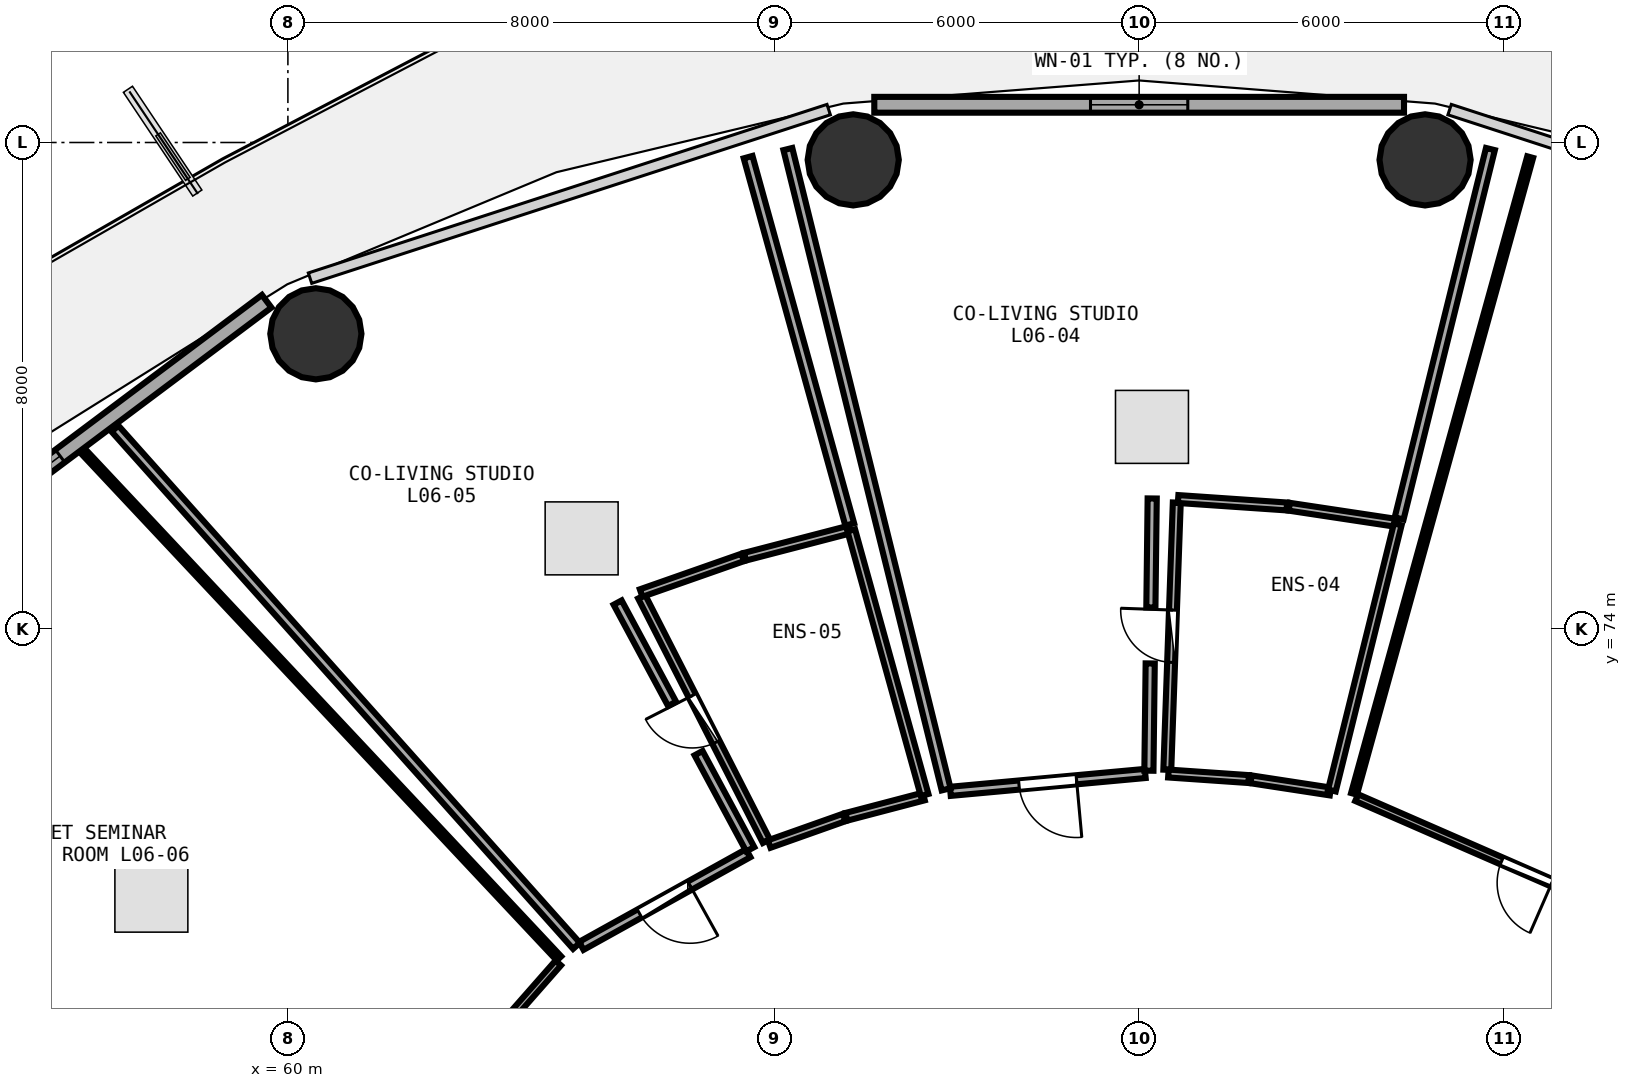
"""IFC4 building model, lengths in metres.
Left out: names, types, materials, properties, quantities, classifications, styles, units other than length and angle.
Written with IfcOpenShell. Run it as: python <this file> out.ifc"""

import sys

from ifc_helpers import new_model, si_unit, direction, frame, frame_2d, origin, origin_2d, place, context, subcontext, project, spatial, rectangle, circle, extrude, element, fill, save


model = new_model("IFC4")
c1 = context("Model", 3, precision=1e-05, world=origin(), true_north=direction((0.0, 1.0)))
c2 = subcontext(c1, "Body", "Model", "MODEL_VIEW")
j1 = project(units=[si_unit("LENGTHUNIT", "METRE"), si_unit("PLANEANGLEUNIT", "RADIAN")], contexts=[c1])
p1 = place(None, origin())
s1 = spatial("IfcSite", under=j1, at=p1, CompositionType="ELEMENT")
p2 = place(p1, origin())
s2 = spatial("IfcBuilding", under=s1, at=p2, CompositionType="ELEMENT")
p3 = place(p2, frame((0.0, 0.0, 26.25)))
s3 = spatial("IfcBuildingStorey", under=s2, at=p3, CompositionType="ELEMENT", Elevation=26.25)
for number, where, z_axis, x_axis in (
    (1, (78.702, 81.714, 0.0), (0.0, 0.0, 1.0), (1.0, 0.0, 0.0)),
    (2, (69.298, 81.714, 0.0), (0.0, 0.0, 1.0), (1.0, 0.0, 0.0)),
    (3, (60.46, 78.854, 0.0), (0.0, 0.0, 1.0), (1.0, 0.0, 0.0)),
):
    element("IfcColumn", number, at=place(p3, frame(where, z_axis=z_axis, x_axis=x_axis)), inside=s3, PredefinedType="COLUMN", context=c2, shape_type="SweptSolid", body=[
        extrude(circle(Radius=0.75, at=origin_2d()), origin(), (0.0, 0.0, 1.0), 3.75),
    ])
p4 = place(p3, frame((78.356, 82.62, 0.0), z_axis=(0.0, 0.0, 1.0), x_axis=(-1.0, 0.0, 0.0)))
e4 = element("IfcWall", 4, at=p4, inside=s3, PredefinedType="SOLIDWALL", context=c2, shape_type="SweptSolid", body=[
    extrude(rectangle(XDim=8.712, YDim=0.26, at=frame_2d((4.356, 0.0))), origin(), (0.0, 0.0, 1.0), 3.475),
])
p5 = place(p4, frame((3.556, 0.0, 0.85)))
e5 = element("IfcOpeningElement", 5, at=p5, cuts=e4, PredefinedType="OPENING", context=c2, shape_type="SweptSolid", body=[
    extrude(rectangle(XDim=1.6, YDim=1.45, at=frame_2d((0.8, 0.725))), frame((0.0, 0.14, 0.0), z_axis=(0.0, -1.0, 0.0), x_axis=(1.0, 0.0, 0.0)), (0.0, 0.0, 1.0), 0.28),
])
p6 = place(p3, frame((59.651, 79.389, 0.0), z_axis=(0.0, 0.0, 1.0), x_axis=(-0.80030733173, -0.599590005569, 0.0)))
e6 = element("IfcWall", 6, at=p6, inside=s3, PredefinedType="SOLIDWALL", context=c2, shape_type="SweptSolid", body=[
    extrude(rectangle(XDim=8.291, YDim=0.26, at=frame_2d((4.145, 0.0))), origin(), (0.0, 0.0, 1.0), 3.475),
])
p7 = place(p6, frame((4.245, 0.0, 0.85)))
e7 = element("IfcOpeningElement", 7, at=p7, cuts=e6, PredefinedType="OPENING", context=c2, shape_type="SweptSolid", body=[
    extrude(rectangle(XDim=1.6, YDim=1.45, at=frame_2d((0.8, 0.725))), frame((0.0, 0.14, 0.0), z_axis=(0.0, -1.0, 0.0), x_axis=(1.0, 0.0, 0.0)), (0.0, 0.0, 1.0), 0.28),
])
p8 = place(p3, frame((83.172, 68.783, 0.0), z_axis=(0.0, 0.0, 1.0), x_axis=(-0.916419655578, 0.400218708797, 0.0)))
e8 = element("IfcWall", 8, at=p8, inside=s3, PredefinedType="PARTITIONING", context=c2, shape_type="SweptSolid", body=[
    extrude(rectangle(XDim=6.104, YDim=0.12, at=frame_2d((3.052, 0.0))), origin(), (0.0, 0.0, 1.0), 2.875),
])
p9 = place(p8, frame((2.602, 0.0, 0.0)))
e9 = element("IfcOpeningElement", 9, at=p9, cuts=e8, PredefinedType="OPENING", context=c2, shape_type="SweptSolid", body=[
    extrude(rectangle(XDim=0.9, YDim=2.08, at=frame_2d((0.45, 1.04))), frame((0.0, 0.07, 0.0), z_axis=(0.0, -1.0, 0.0), x_axis=(1.0, 0.0, 0.0)), (0.0, 0.0, 1.0), 0.14),
])
p10 = place(p3, frame((74.463, 71.684, 0.0), z_axis=(0.0, 0.0, 1.0), x_axis=(0.035428098094, 0.999372227884, 0.0)))
e10 = element("IfcWall", 10, at=p10, inside=s3, PredefinedType="PLUMBINGWALL", context=c2, shape_type="SweptSolid", body=[
    extrude(rectangle(XDim=4.396, YDim=0.13, at=frame_2d((2.198, 0.0))), origin(), (0.0, 0.0, 1.0), 3.175),
])
p11 = place(p10, frame((1.768, 0.0, 0.0)))
e11 = element("IfcOpeningElement", 11, at=p11, cuts=e10, PredefinedType="OPENING", context=c2, shape_type="SweptSolid", body=[
    extrude(rectangle(XDim=0.86, YDim=2.05, at=frame_2d((0.43, 1.025))), frame((0.0, 0.075, 0.0), z_axis=(0.0, -1.0, 0.0), x_axis=(1.0, 0.0, 0.0)), (0.0, 0.0, 1.0), 0.15),
])
p12 = place(p3, frame((74.1, 71.624, 0.0), z_axis=(0.0, 0.0, 1.0), x_axis=(-0.995822031417, -0.091315287572, 0.0)))
e12 = element("IfcWall", 12, at=p12, inside=s3, PredefinedType="PARTITIONING", context=c2, shape_type="SweptSolid", body=[
    extrude(rectangle(XDim=3.219, YDim=0.15, at=frame_2d((1.609, 0.0))), origin(), (0.0, 0.0, 1.0), 3.235),
])
p13 = place(p12, frame((1.135, 0.0, 0.0)))
e13 = element("IfcOpeningElement", 13, at=p13, cuts=e12, PredefinedType="OPENING", context=c2, shape_type="SweptSolid", body=[
    extrude(rectangle(XDim=0.95, YDim=2.08, at=frame_2d((0.475, 1.04))), frame((0.0, 0.085, 0.0), z_axis=(0.0, -1.0, 0.0), x_axis=(1.0, 0.0, 0.0)), (0.0, 0.0, 1.0), 0.17),
])
p14 = place(p3, frame((67.87, 70.51, 0.0), z_axis=(0.0, 0.0, 1.0), x_axis=(-0.45442479933, 0.890785104138, 0.0)))
e14 = element("IfcWall", 14, at=p14, inside=s3, PredefinedType="PLUMBINGWALL", context=c2, shape_type="SweptSolid", body=[
    extrude(rectangle(XDim=4.514, YDim=0.13, at=frame_2d((2.257, 0.0))), origin(), (0.0, 0.0, 1.0), 3.175),
])
p15 = place(p14, frame((1.827, 0.0, 0.0)))
e15 = element("IfcOpeningElement", 15, at=p15, cuts=e14, PredefinedType="OPENING", context=c2, shape_type="SweptSolid", body=[
    extrude(rectangle(XDim=0.86, YDim=2.05, at=frame_2d((0.43, 1.025))), frame((0.0, 0.075, 0.0), z_axis=(0.0, -1.0, 0.0), x_axis=(1.0, 0.0, 0.0)), (0.0, 0.0, 1.0), 0.15),
])
p16 = place(p3, frame((67.571, 70.313, 0.0), z_axis=(0.0, 0.0, 1.0), x_axis=(-0.874179278891, -0.48560332408, 0.0)))
e16 = element("IfcWall", 16, at=p16, inside=s3, PredefinedType="PARTITIONING", context=c2, shape_type="SweptSolid", body=[
    extrude(rectangle(XDim=3.14, YDim=0.15, at=frame_2d((1.57, 0.0))), origin(), (0.0, 0.0, 1.0), 3.48),
])
p17 = place(p16, frame((1.095, 0.0, 0.0)))
e17 = element("IfcOpeningElement", 17, at=p17, cuts=e16, PredefinedType="OPENING", context=c2, shape_type="SweptSolid", body=[
    extrude(rectangle(XDim=0.95, YDim=2.08, at=frame_2d((0.475, 1.04))), frame((0.0, 0.085, 0.0), z_axis=(0.0, -1.0, 0.0), x_axis=(1.0, 0.0, 0.0)), (0.0, 0.0, 1.0), 0.17),
])
p18 = place(p3, frame((64.446, 68.507, 0.0), z_axis=(0.0, 0.0, 1.0), x_axis=(-0.660323401664, -0.75098136143, 0.0)))
e18 = element("IfcWall", 18, at=p18, inside=s3, PredefinedType="PARTITIONING", context=c2, shape_type="SweptSolid", body=[
    extrude(rectangle(XDim=5.857, YDim=0.12, at=frame_2d((2.929, 0.0))), origin(), (0.0, 0.0, 1.0), 2.875),
])
p19 = place(p18, frame((2.479, 0.0, 0.0)))
e19 = element("IfcOpeningElement", 19, at=p19, cuts=e18, PredefinedType="OPENING", context=c2, shape_type="SweptSolid", body=[
    extrude(rectangle(XDim=0.9, YDim=2.08, at=frame_2d((0.45, 1.04))), frame((0.0, 0.07, 0.0), z_axis=(0.0, -1.0, 0.0), x_axis=(1.0, 0.0, 0.0)), (0.0, 0.0, 1.0), 0.14),
])
p20 = place(p3, frame((77.534, 71.289, 0.0), z_axis=(0.0, 0.0, 1.0), x_axis=(0.26671307518, 0.963775977875, 0.0)))
e20 = element("IfcWall", 20, at=p20, inside=s3, PredefinedType="PARTITIONING", context=c2, shape_type="SweptSolid", body=[
    extrude(rectangle(XDim=10.865, YDim=0.1, at=frame_2d((5.432, 0.0))), origin(), (0.0, 0.0, 1.0), 2.875),
])
p21 = place(p3, frame((77.145, 71.327, 0.0), z_axis=(0.0, 0.0, 1.0), x_axis=(-0.988427236939, 0.151695739152, 0.0)))
e21 = element("IfcWall", 21, at=p21, inside=s3, PredefinedType="PLUMBINGWALL", context=c2, shape_type="SweptSolid", body=[
    extrude(rectangle(XDim=1.32, YDim=0.13, at=frame_2d((0.66, 0.0))), origin(), (0.0, 0.0, 1.0), 3.235),
])
p22 = place(p3, frame((75.801, 71.531, 0.0), z_axis=(0.0, 0.0, 1.0), x_axis=(-0.997629018134, 0.068821088175, 0.0)))
e22 = element("IfcWall", 22, at=p22, inside=s3, PredefinedType="PLUMBINGWALL", context=c2, shape_type="SweptSolid", body=[
    extrude(rectangle(XDim=1.323, YDim=0.13, at=frame_2d((0.662, 0.0))), origin(), (0.0, 0.0, 1.0), 3.48),
])
p23 = place(p3, frame((74.641, 76.137, 0.0), z_axis=(0.0, 0.0, 1.0), x_axis=(0.997667905772, -0.06825503493, 0.0)))
e23 = element("IfcWall", 23, at=p23, inside=s3, PredefinedType="PLUMBINGWALL", context=c2, shape_type="SweptSolid", body=[
    extrude(rectangle(XDim=1.792, YDim=0.13, at=frame_2d((0.896, 0.0))), origin(), (0.0, 0.0, 1.0), 3.48),
])
p24 = place(p3, frame((76.469, 76.01, 0.0), z_axis=(0.0, 0.0, 1.0), x_axis=(0.988799846431, -0.14924765894, 0.0)))
e24 = element("IfcWall", 24, at=p24, inside=s3, PredefinedType="PLUMBINGWALL", context=c2, shape_type="SweptSolid", body=[
    extrude(rectangle(XDim=1.79, YDim=0.13, at=frame_2d((0.895, 0.0))), origin(), (0.0, 0.0, 1.0), 3.48),
])
p25 = place(p3, frame((78.253, 75.721, 0.0), z_axis=(0.0, 0.0, 1.0), x_axis=(-0.240229117536, -0.970716215528, 0.0)))
e25 = element("IfcWall", 25, at=p25, inside=s3, PredefinedType="PLUMBINGWALL", context=c2, shape_type="SweptSolid", body=[
    extrude(rectangle(XDim=4.509, YDim=0.13, at=frame_2d((2.255, 0.0))), origin(), (0.0, 0.0, 1.0), 3.175),
])
p26 = place(p3, frame((70.825, 71.363, 0.0), z_axis=(0.0, 0.0, 1.0), x_axis=(-0.239971369295, 0.970779965759, 0.0)))
e26 = element("IfcWall", 26, at=p26, inside=s3, PredefinedType="PARTITIONING", context=c2, shape_type="SweptSolid", body=[
    extrude(rectangle(XDim=10.846, YDim=0.15, at=frame_2d((5.423, 0.0))), origin(), (0.0, 0.0, 1.0), 2.875),
])
p27 = place(p3, frame((79.777, 81.892, 0.0), z_axis=(0.0, 0.0, 1.0), x_axis=(-0.240000910349, -0.970772662899, 0.0)))
e27 = element("IfcWall", 27, at=p27, inside=s3, PredefinedType="PARTITIONING", context=c2, shape_type="SweptSolid", body=[
    extrude(rectangle(XDim=6.257, YDim=0.15, at=frame_2d((3.128, 0.0))), origin(), (0.0, 0.0, 1.0), 2.875),
])
p28 = place(p3, frame((74.215, 76.146, 0.0), z_axis=(0.0, 0.0, 1.0), x_axis=(-0.012119496596, -0.999926556204, 0.0)))
e28 = element("IfcWall", 28, at=p28, inside=s3, PredefinedType="PARTITIONING", context=c2, shape_type="SweptSolid", body=[
    extrude(rectangle(XDim=1.793, YDim=0.15, at=frame_2d((0.896, 0.0))), origin(), (0.0, 0.0, 1.0), 3.175),
])
p29 = place(p3, frame((74.182, 73.433, 0.0), z_axis=(0.0, 0.0, 1.0), x_axis=(-0.01217734225, -0.999925853419, 0.0)))
e29 = element("IfcWall", 29, at=p29, inside=s3, PredefinedType="PARTITIONING", context=c2, shape_type="SweptSolid", body=[
    extrude(rectangle(XDim=1.764, YDim=0.15, at=frame_2d((0.882, 0.0))), origin(), (0.0, 0.0, 1.0), 3.48),
])
p30 = place(p3, frame((70.458, 71.245, 0.0), z_axis=(0.0, 0.0, 1.0), x_axis=(-0.967235526128, -0.253880753498, 0.0)))
e30 = element("IfcWall", 30, at=p30, inside=s3, PredefinedType="PLUMBINGWALL", context=c2, shape_type="SweptSolid", body=[
    extrude(rectangle(XDim=1.314, YDim=0.13, at=frame_2d((0.657, 0.0))), origin(), (0.0, 0.0, 1.0), 3.235),
])
p31 = place(p3, frame((69.148, 70.899, 0.0), z_axis=(0.0, 0.0, 1.0), x_axis=(-0.942537812533, -0.33409949408, 0.0)))
e31 = element("IfcWall", 31, at=p31, inside=s3, PredefinedType="PLUMBINGWALL", context=c2, shape_type="SweptSolid", body=[
    extrude(rectangle(XDim=1.307, YDim=0.13, at=frame_2d((0.654, 0.0))), origin(), (0.0, 0.0, 1.0), 3.48),
])
p32 = place(p3, frame((65.81, 74.591, 0.0), z_axis=(0.0, 0.0, 1.0), x_axis=(0.943615101484, 0.331044619728, 0.0)))
e32 = element("IfcWall", 32, at=p32, inside=s3, PredefinedType="PLUMBINGWALL", context=c2, shape_type="SweptSolid", body=[
    extrude(rectangle(XDim=1.77, YDim=0.13, at=frame_2d((0.885, 0.0))), origin(), (0.0, 0.0, 1.0), 3.48),
])
p33 = place(p3, frame((67.518, 75.188, 0.0), z_axis=(0.0, 0.0, 1.0), x_axis=(0.967790422801, 0.251757219427, 0.0)))
e33 = element("IfcWall", 33, at=p33, inside=s3, PredefinedType="PLUMBINGWALL", context=c2, shape_type="SweptSolid", body=[
    extrude(rectangle(XDim=1.78, YDim=0.13, at=frame_2d((0.89, 0.0))), origin(), (0.0, 0.0, 1.0), 3.48),
])
p34 = place(p3, frame((69.265, 75.622, 0.0), z_axis=(0.0, 0.0, 1.0), x_axis=(0.267094578575, -0.963670320232, 0.0)))
e34 = element("IfcWall", 34, at=p34, inside=s3, PredefinedType="PLUMBINGWALL", context=c2, shape_type="SweptSolid", body=[
    extrude(rectangle(XDim=4.516, YDim=0.13, at=frame_2d((2.258, 0.0))), origin(), (0.0, 0.0, 1.0), 2.875),
])
p35 = place(p3, frame((64.746, 68.789, 0.0), z_axis=(0.0, 0.0, 1.0), x_axis=(-0.66580890104, 0.746122313897, 0.0)))
e35 = element("IfcWall", 35, at=p35, inside=s3, PredefinedType="PARTITIONING", context=c2, shape_type="SweptSolid", body=[
    extrude(rectangle(XDim=11.399, YDim=0.15, at=frame_2d((5.7, 0.0))), origin(), (0.0, 0.0, 1.0), 2.875),
])
p36 = place(p3, frame((67.569, 81.76, 0.0), z_axis=(0.0, 0.0, 1.0), x_axis=(0.266691519666, -0.963781942837, 0.0)))
e36 = element("IfcWall", 36, at=p36, inside=s3, PredefinedType="PARTITIONING", context=c2, shape_type="SweptSolid", body=[
    extrude(rectangle(XDim=6.268, YDim=0.15, at=frame_2d((3.134, 0.0))), origin(), (0.0, 0.0, 1.0), 2.875),
])
p37 = place(p3, frame((65.423, 74.434, 0.0), z_axis=(0.0, 0.0, 1.0), x_axis=(0.473660949034, -0.880707275637, 0.0)))
e37 = element("IfcWall", 37, at=p37, inside=s3, PredefinedType="PARTITIONING", context=c2, shape_type="SweptSolid", body=[
    extrude(rectangle(XDim=1.891, YDim=0.15, at=frame_2d((0.946, 0.0))), origin(), (0.0, 0.0, 1.0), 3.175),
])
p38 = place(p3, frame((66.754, 71.958, 0.0), z_axis=(0.0, 0.0, 1.0), x_axis=(0.473466863657, -0.880811630838, 0.0)))
e38 = element("IfcWall", 38, at=p38, inside=s3, PredefinedType="PARTITIONING", context=c2, shape_type="SweptSolid", body=[
    extrude(rectangle(XDim=1.794, YDim=0.15, at=frame_2d((0.897, 0.0))), origin(), (0.0, 0.0, 1.0), 3.235),
])
p39 = place(p3, frame((60.502, 64.079, 0.0), z_axis=(0.0, 0.0, 1.0), x_axis=(-0.917695041134, 0.397285554077, 0.0)))
e39 = element("IfcWall", 39, at=p39, inside=s3, PredefinedType="PARTITIONING", context=c2, shape_type="SweptSolid", body=[
    extrude(rectangle(XDim=12.07, YDim=0.1, at=frame_2d((6.035, 0.0))), origin(), (0.0, 0.0, 1.0), 2.875),
])
p40 = place(p3, frame((56.632, 76.922, 0.0), z_axis=(0.0, 0.0, 1.0), x_axis=(0.684261294523, -0.729236916796, 0.0)))
e40 = element("IfcWall", 40, at=p40, inside=s3, PredefinedType="PARTITIONING", context=c2, shape_type="SweptSolid", body=[
    extrude(rectangle(XDim=11.438, YDim=0.1, at=frame_2d((5.719, 0.0))), origin(), (0.0, 0.0, 1.0), 2.875),
])
p41 = place(p5, origin())
e41 = element("IfcWindow", 41, at=p41, inside=s3, PartitioningType="SINGLE_PANEL", PredefinedType="WINDOW", context=c2, shape_type="SweptSolid", body=[
    extrude(rectangle(XDim=1.6, YDim=1.45, at=frame_2d((0.8, 0.725))), frame((0.0, 0.03, 0.0), z_axis=(0.0, -1.0, 0.0), x_axis=(1.0, 0.0, 0.0)), (0.0, 0.0, 1.0), 0.06),
])
fill(e5, e41)
p42 = place(p7, origin())
e42 = element("IfcWindow", 42, at=p42, inside=s3, PartitioningType="SINGLE_PANEL", PredefinedType="WINDOW", context=c2, shape_type="SweptSolid", body=[
    extrude(rectangle(XDim=1.6, YDim=1.45, at=frame_2d((0.8, 0.725))), frame((0.0, 0.03, 0.0), z_axis=(0.0, -1.0, 0.0), x_axis=(1.0, 0.0, 0.0)), (0.0, 0.0, 1.0), 0.06),
])
fill(e7, e42)
p43 = place(p9, origin())
e43 = element("IfcDoor", 43, at=p43, inside=s3, OperationType="SINGLE_SWING_LEFT", PredefinedType="DOOR", context=c2, shape_type="SweptSolid", body=[
    extrude(rectangle(XDim=0.9, YDim=2.08, at=frame_2d((0.45, 1.04))), frame((0.0, 0.025, 0.0), z_axis=(0.0, -1.0, 0.0), x_axis=(1.0, 0.0, 0.0)), (0.0, 0.0, 1.0), 0.05),
])
fill(e9, e43)
p44 = place(p11, origin())
e44 = element("IfcDoor", 44, at=p44, inside=s3, OperationType="SINGLE_SWING_RIGHT", PredefinedType="DOOR", context=c2, shape_type="SweptSolid", body=[
    extrude(rectangle(XDim=0.86, YDim=2.05, at=frame_2d((0.43, 1.025))), frame((0.0, 0.025, 0.0), z_axis=(0.0, -1.0, 0.0), x_axis=(1.0, 0.0, 0.0)), (0.0, 0.0, 1.0), 0.05),
])
fill(e11, e44)
p45 = place(p13, origin())
e45 = element("IfcDoor", 45, at=p45, inside=s3, OperationType="SINGLE_SWING_LEFT", PredefinedType="DOOR", context=c2, shape_type="SweptSolid", body=[
    extrude(rectangle(XDim=0.95, YDim=2.08, at=frame_2d((0.475, 1.04))), frame((0.0, 0.025, 0.0), z_axis=(0.0, -1.0, 0.0), x_axis=(1.0, 0.0, 0.0)), (0.0, 0.0, 1.0), 0.05),
])
fill(e13, e45)
p46 = place(p15, origin())
e46 = element("IfcDoor", 46, at=p46, inside=s3, OperationType="SINGLE_SWING_RIGHT", PredefinedType="DOOR", context=c2, shape_type="SweptSolid", body=[
    extrude(rectangle(XDim=0.86, YDim=2.05, at=frame_2d((0.43, 1.025))), frame((0.0, 0.025, 0.0), z_axis=(0.0, -1.0, 0.0), x_axis=(1.0, 0.0, 0.0)), (0.0, 0.0, 1.0), 0.05),
])
fill(e15, e46)
p47 = place(p17, origin())
e47 = element("IfcDoor", 47, at=p47, inside=s3, OperationType="SINGLE_SWING_LEFT", PredefinedType="DOOR", context=c2, shape_type="SweptSolid", body=[
    extrude(rectangle(XDim=0.95, YDim=2.08, at=frame_2d((0.475, 1.04))), frame((0.0, 0.025, 0.0), z_axis=(0.0, -1.0, 0.0), x_axis=(1.0, 0.0, 0.0)), (0.0, 0.0, 1.0), 0.05),
])
fill(e17, e47)
save(model, sys.argv[1])
